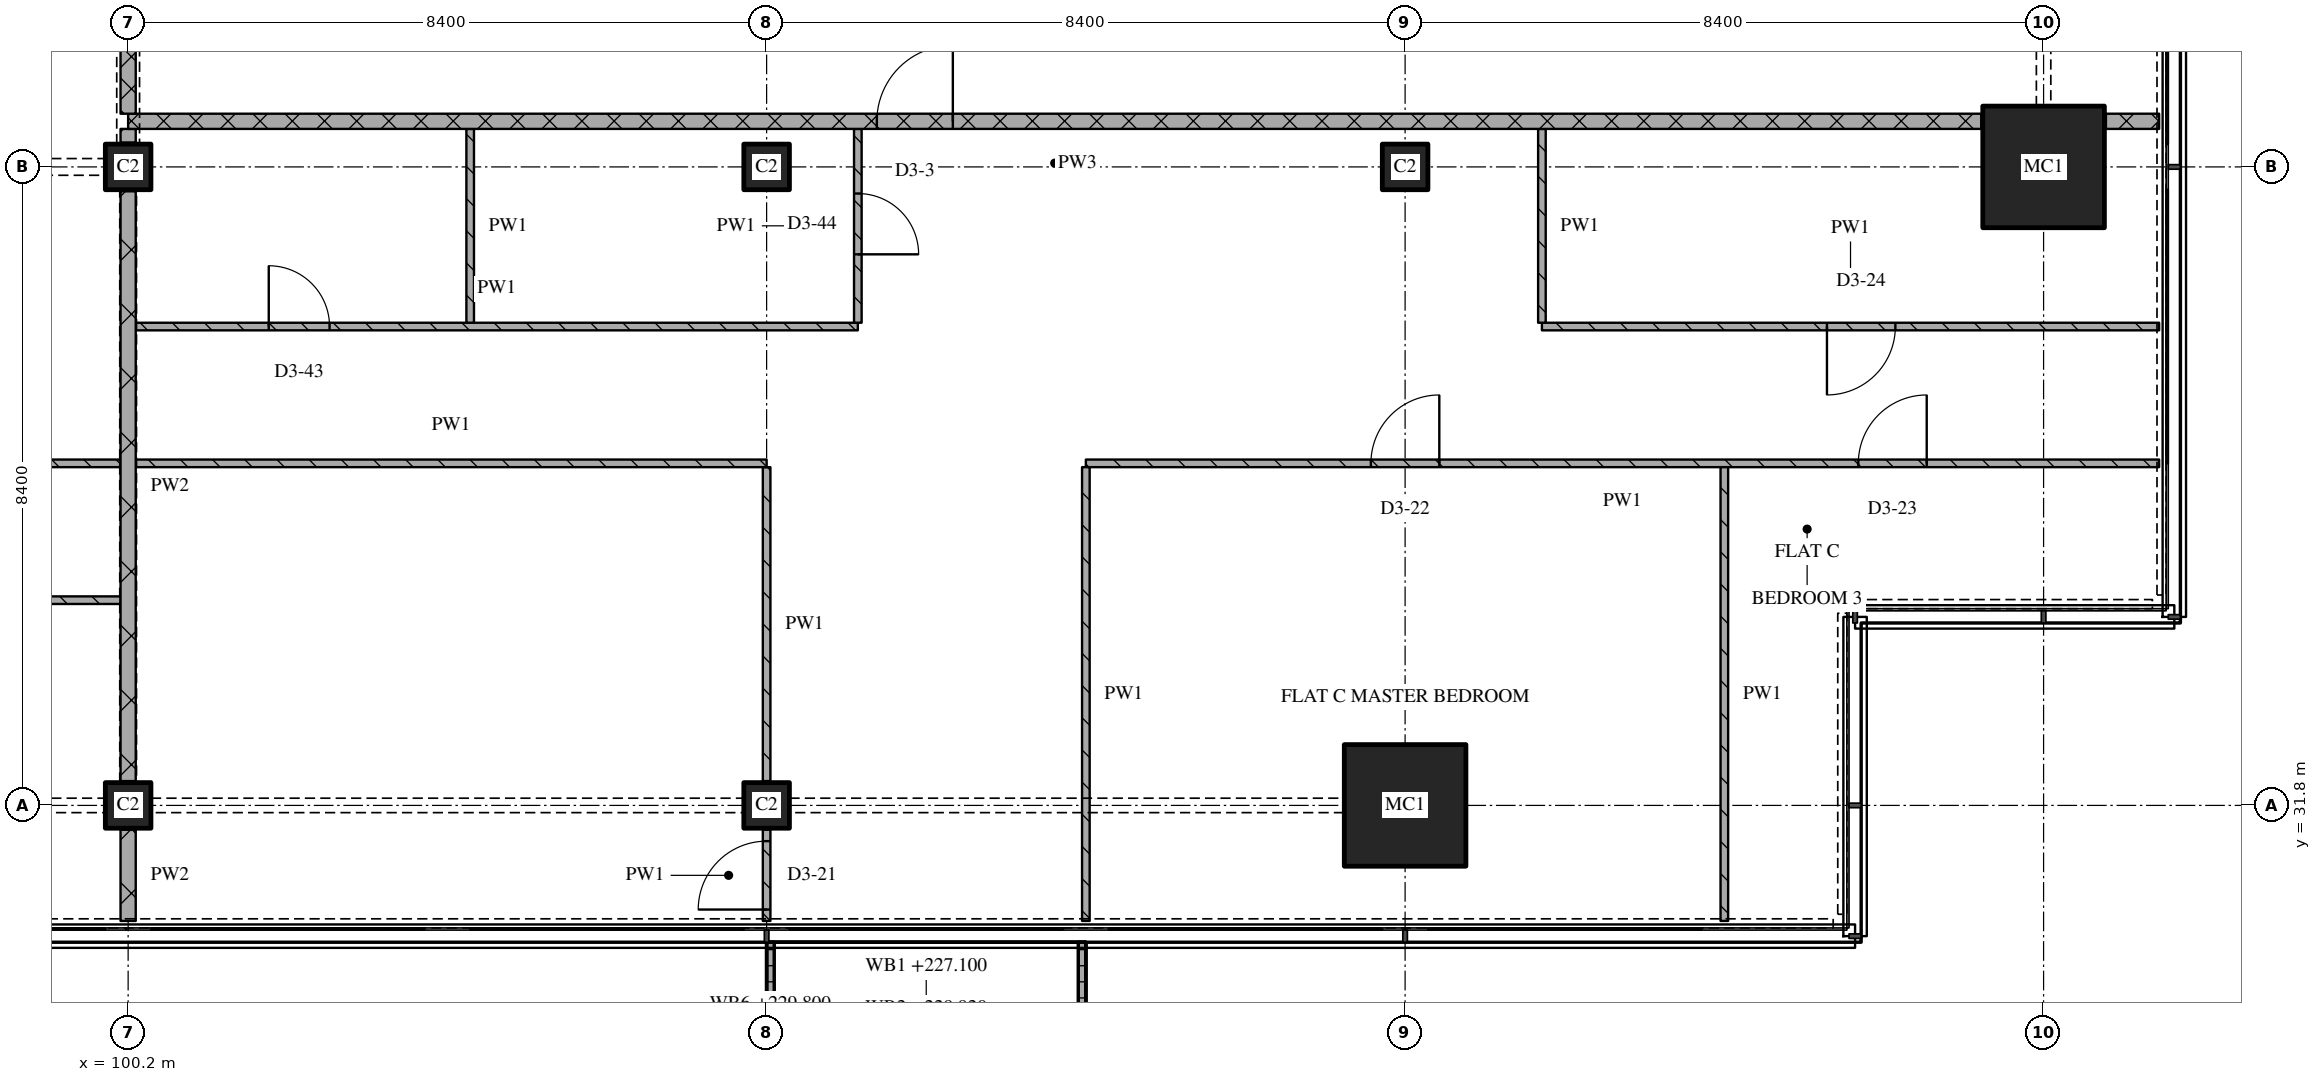
"""IFC4 building model, lengths in metres.
Left out: names, types, materials, properties, quantities, classifications, styles, units other than length and angle.
Written with IfcOpenShell. Run it as: python <this file> out.ifc"""

import sys

from ifc_helpers import new_model, si_unit, direction, frame, frame_2d, origin, origin_2d, place, context, subcontext, project, spatial, polyline, rectangle, outline, extrude, element, fill, save


model = new_model("IFC4")
c1 = context("Model", 3, precision=1e-05, world=origin(), true_north=direction((0.0, 1.0)))
c2 = subcontext(c1, "Body", "Model", "MODEL_VIEW")
j1 = project(units=[si_unit("LENGTHUNIT", "METRE"), si_unit("PLANEANGLEUNIT", "RADIAN")], contexts=[c1])
p1 = place(None, origin())
s1 = spatial("IfcSite", under=j1, at=p1, CompositionType="ELEMENT")
p2 = place(p1, origin())
s2 = spatial("IfcBuilding", under=s1, at=p2, CompositionType="ELEMENT")
p3 = place(p2, frame((0.0, 0.0, 227.1)))
s3 = spatial("IfcBuildingStorey", under=s2, at=p3, CompositionType="ELEMENT", Elevation=227.1)
for number, where, z_axis, x_axis in (
    (1, (100.2, 31.8, 0.0), (0.0, 0.0, 1.0), (1.0, 0.0, 0.0)),
    (2, (100.2, 40.2, 0.0), (0.0, 0.0, 1.0), (1.0, 0.0, 0.0)),
    (3, (108.6, 31.8, 0.0), (0.0, 0.0, 1.0), (1.0, 0.0, 0.0)),
    (4, (108.6, 40.2, 0.0), (0.0, 0.0, 1.0), (1.0, 0.0, 0.0)),
):
    element("IfcColumn", number, at=place(p3, frame(where, z_axis=z_axis, x_axis=x_axis)), inside=s3, PredefinedType="COLUMN", context=c2, shape_type="SweptSolid", body=[
        extrude(rectangle(XDim=0.6, YDim=0.6, at=origin_2d()), origin(), (0.0, 0.0, 1.0), 3.6),
    ])
p4 = place(p3, frame((117.0, 31.8, 0.0), z_axis=(0.0, 0.0, 1.0), x_axis=(1.0, 0.0, 0.0)))
e5 = element("IfcColumn", 5, at=p4, inside=s3, PredefinedType="COLUMN", context=c2, shape_type="SweptSolid", body=[
    extrude(rectangle(XDim=1.6, YDim=1.6, at=origin_2d()), origin(), (0.0, 0.0, 1.0), 3.6),
])
p5 = place(p3, frame((117.0, 40.2, 0.0), z_axis=(0.0, 0.0, 1.0), x_axis=(1.0, 0.0, 0.0)))
e6 = element("IfcColumn", 6, at=p5, inside=s3, PredefinedType="COLUMN", context=c2, shape_type="SweptSolid", body=[
    extrude(rectangle(XDim=0.6, YDim=0.6, at=origin_2d()), origin(), (0.0, 0.0, 1.0), 3.6),
])
p6 = place(p3, frame((125.4, 40.2, 0.0), z_axis=(0.0, 0.0, 1.0), x_axis=(1.0, 0.0, 0.0)))
e7 = element("IfcColumn", 7, at=p6, inside=s3, PredefinedType="COLUMN", context=c2, shape_type="SweptSolid", body=[
    extrude(rectangle(XDim=1.6, YDim=1.6, at=origin_2d()), origin(), (0.0, 0.0, 1.0), 3.6),
])
p7 = place(p3, origin())
e8 = element("IfcWall", 8, at=p7, inside=s3, PredefinedType="SOLIDWALL", context=c2, shape_type="SweptSolid", body=[
    extrude(outline(polyline([(108.6, 30.0), (108.7, 30.0), (108.7, 28.367), (112.7, 28.367), (112.7, 30.0), (112.8, 30.0), (112.8, 28.267), (108.6, 28.267), (108.6, 30.0)])), origin(), (0.0, 0.0, 1.0), 1.0),
])
p8 = place(p3, frame((100.1, 34.5, 0.0), z_axis=(0.0, 0.0, 1.0), x_axis=(-1.0, 0.0, 0.0)))
e9 = element("IfcWall", 9, at=p8, inside=s3, PredefinedType="PARTITIONING", context=c2, shape_type="SweptSolid", body=[
    extrude(rectangle(XDim=20.9, YDim=0.1, at=frame_2d((10.45, 0.0))), origin(), (0.0, 0.0, 1.0), 3.32),
])
p9 = place(p8, frame((3.65, 0.0, 0.0)))
e10 = element("IfcOpeningElement", 10, at=p9, cuts=e9, PredefinedType="OPENING", context=c2, shape_type="SweptSolid", body=[
    extrude(rectangle(XDim=0.9, YDim=2.1, at=frame_2d((0.45, 1.05))), frame((0.0, 0.06, 0.0), z_axis=(0.0, -1.0, 0.0), x_axis=(1.0, 0.0, 0.0)), (0.0, 0.0, 1.0), 0.12),
])
p10 = place(p8, frame((9.95, 0.0, 0.0)))
e11 = element("IfcOpeningElement", 11, at=p10, cuts=e9, PredefinedType="OPENING", context=c2, shape_type="SweptSolid", body=[
    extrude(rectangle(XDim=0.9, YDim=2.1, at=frame_2d((0.45, 1.05))), frame((0.0, 0.06, 0.0), z_axis=(0.0, -1.0, 0.0), x_axis=(1.0, 0.0, 0.0)), (0.0, 0.0, 1.0), 0.12),
])
p11 = place(p8, frame((14.15, 0.0, 0.0)))
e12 = element("IfcOpeningElement", 12, at=p11, cuts=e9, PredefinedType="OPENING", context=c2, shape_type="SweptSolid", body=[
    extrude(rectangle(XDim=0.9, YDim=2.1, at=frame_2d((0.45, 1.05))), frame((0.0, 0.06, 0.0), z_axis=(0.0, -1.0, 0.0), x_axis=(1.0, 0.0, 0.0)), (0.0, 0.0, 1.0), 0.12),
])
p12 = place(p8, frame((18.35, 0.0, 0.0)))
e13 = element("IfcOpeningElement", 13, at=p12, cuts=e9, PredefinedType="OPENING", context=c2, shape_type="SweptSolid", body=[
    extrude(rectangle(XDim=0.9, YDim=2.1, at=frame_2d((0.45, 1.05))), frame((0.0, 0.06, 0.0), z_axis=(0.0, -1.0, 0.0), x_axis=(1.0, 0.0, 0.0)), (0.0, 0.0, 1.0), 0.12),
])
p13 = place(p3, frame((126.92, 36.3, 0.0), z_axis=(0.0, 0.0, 1.0), x_axis=(-1.0, 0.0, 0.0)))
e14 = element("IfcWall", 14, at=p13, inside=s3, PredefinedType="PARTITIONING", context=c2, shape_type="SweptSolid", body=[
    extrude(rectangle(XDim=14.12, YDim=0.1, at=frame_2d((7.06, 0.0))), origin(), (0.0, 0.0, 1.0), 3.32),
])
p14 = place(p13, frame((3.058, 0.0, 0.0)))
e15 = element("IfcOpeningElement", 15, at=p14, cuts=e14, PredefinedType="OPENING", context=c2, shape_type="SweptSolid", body=[
    extrude(rectangle(XDim=0.9, YDim=2.1, at=frame_2d((0.45, 1.05))), frame((0.0, 0.06, 0.0), z_axis=(0.0, -1.0, 0.0), x_axis=(1.0, 0.0, 0.0)), (0.0, 0.0, 1.0), 0.12),
])
p15 = place(p13, frame((9.47, 0.0, 0.0)))
e16 = element("IfcOpeningElement", 16, at=p15, cuts=e14, PredefinedType="OPENING", context=c2, shape_type="SweptSolid", body=[
    extrude(rectangle(XDim=0.9, YDim=2.1, at=frame_2d((0.45, 1.05))), frame((0.0, 0.06, 0.0), z_axis=(0.0, -1.0, 0.0), x_axis=(1.0, 0.0, 0.0)), (0.0, 0.0, 1.0), 0.12),
])
p16 = place(p3, frame((100.3, 38.1, 0.0), z_axis=(0.0, 0.0, 1.0), x_axis=(1.0, 0.0, 0.0)))
e17 = element("IfcWall", 17, at=p16, inside=s3, PredefinedType="PARTITIONING", context=c2, shape_type="SweptSolid", body=[
    extrude(rectangle(XDim=9.5, YDim=0.1, at=frame_2d((4.75, 0.0))), origin(), (0.0, 0.0, 1.0), 3.32),
])
p17 = place(p16, frame((1.75, 0.0, 0.0)))
e18 = element("IfcOpeningElement", 18, at=p17, cuts=e17, PredefinedType="OPENING", context=c2, shape_type="SweptSolid", body=[
    extrude(rectangle(XDim=0.8, YDim=2.1, at=frame_2d((0.4, 1.05))), frame((0.0, 0.06, 0.0), z_axis=(0.0, -1.0, 0.0), x_axis=(1.0, 0.0, 0.0)), (0.0, 0.0, 1.0), 0.12),
])
p18 = place(p3, frame((118.8, 38.1, 0.0), z_axis=(0.0, 0.0, 1.0), x_axis=(1.0, 0.0, 0.0)))
e19 = element("IfcWall", 19, at=p18, inside=s3, PredefinedType="PARTITIONING", context=c2, shape_type="SweptSolid", body=[
    extrude(rectangle(XDim=8.12, YDim=0.1, at=frame_2d((4.06, 0.0))), origin(), (0.0, 0.0, 1.0), 3.32),
])
p19 = place(p18, frame((3.75, 0.0, 0.0)))
e20 = element("IfcOpeningElement", 20, at=p19, cuts=e19, PredefinedType="OPENING", context=c2, shape_type="SweptSolid", body=[
    extrude(rectangle(XDim=0.9, YDim=2.1, at=frame_2d((0.45, 1.05))), frame((0.0, 0.06, 0.0), z_axis=(0.0, -1.0, 0.0), x_axis=(1.0, 0.0, 0.0)), (0.0, 0.0, 1.0), 0.12),
])
p20 = place(p3, frame((124.58, 40.8, 0.0), z_axis=(0.0, 0.0, 1.0), x_axis=(-1.0, 0.0, 0.0)))
e21 = element("IfcWall", 21, at=p20, inside=s3, PredefinedType="PARTITIONING", context=c2, shape_type="SweptSolid", body=[
    extrude(rectangle(XDim=24.38, YDim=0.2, at=frame_2d((12.19, 0.0))), origin(), (0.0, 0.0, 1.0), 3.32),
])
p21 = place(p20, frame((13.53, 0.0, 0.0)))
e22 = element("IfcOpeningElement", 22, at=p21, cuts=e21, PredefinedType="OPENING", context=c2, shape_type="SweptSolid", body=[
    extrude(rectangle(XDim=1.0, YDim=2.1, at=frame_2d((0.5, 1.05))), frame((0.0, 0.11, 0.0), z_axis=(0.0, -1.0, 0.0), x_axis=(1.0, 0.0, 0.0)), (0.0, 0.0, 1.0), 0.22),
])
p22 = place(p3, frame((126.22, 40.8, 0.0), z_axis=(0.0, 0.0, 1.0), x_axis=(1.0, 0.0, 0.0)))
e23 = element("IfcWall", 23, at=p22, inside=s3, PredefinedType="PARTITIONING", context=c2, shape_type="SweptSolid", body=[
    extrude(rectangle(XDim=0.7, YDim=0.2, at=frame_2d((0.35, 0.0))), origin(), (0.0, 0.0, 1.0), 3.32),
])
p23 = place(p3, frame((100.2, 43.1, 0.0), z_axis=(0.0, 0.0, 1.0), x_axis=(0.0, -1.0, 0.0)))
e24 = element("IfcWall", 24, at=p23, inside=s3, PredefinedType="PARTITIONING", context=c2, shape_type="SweptSolid", body=[
    extrude(rectangle(XDim=2.2, YDim=0.2, at=frame_2d((1.1, 0.0))), origin(), (0.0, 0.0, 1.0), 2.53),
])
p24 = place(p3, frame((100.2, 31.48, 0.0), z_axis=(0.0, 0.0, 1.0), x_axis=(0.0, -1.0, 0.0)))
e25 = element("IfcWall", 25, at=p24, inside=s3, PredefinedType="PARTITIONING", context=c2, shape_type="SweptSolid", body=[
    extrude(rectangle(XDim=1.2, YDim=0.2, at=frame_2d((0.6, 0.0))), origin(), (0.0, 0.0, 1.0), 3.32),
])
p25 = place(p3, frame((100.2, 39.88, 0.0), z_axis=(0.0, 0.0, 1.0), x_axis=(0.0, -1.0, 0.0)))
e26 = element("IfcWall", 26, at=p25, inside=s3, PredefinedType="PARTITIONING", context=c2, shape_type="SweptSolid", body=[
    extrude(rectangle(XDim=7.76, YDim=0.2, at=frame_2d((3.88, 0.0))), origin(), (0.0, 0.0, 1.0), 2.72),
])
p26 = place(p3, frame((100.2, 40.7, 0.0), z_axis=(0.0, 0.0, 1.0), x_axis=(0.0, -1.0, 0.0)))
e27 = element("IfcWall", 27, at=p26, inside=s3, PredefinedType="PARTITIONING", context=c2, shape_type="SweptSolid", body=[
    extrude(rectangle(XDim=0.18, YDim=0.2, at=frame_2d((0.09, 0.0))), origin(), (0.0, 0.0, 1.0), 3.32),
])
p27 = place(p3, frame((104.7, 40.7, 0.0), z_axis=(0.0, 0.0, 1.0), x_axis=(0.0, -1.0, 0.0)))
e28 = element("IfcWall", 28, at=p27, inside=s3, PredefinedType="PARTITIONING", context=c2, shape_type="SweptSolid", body=[
    extrude(rectangle(XDim=2.55, YDim=0.1, at=frame_2d((1.275, 0.0))), origin(), (0.0, 0.0, 1.0), 3.32),
])
p28 = place(p3, frame((108.6, 30.28, 0.0), z_axis=(0.0, 0.0, 1.0), x_axis=(0.0, 1.0, 0.0)))
e29 = element("IfcWall", 29, at=p28, inside=s3, PredefinedType="PARTITIONING", context=c2, shape_type="SweptSolid", body=[
    extrude(rectangle(XDim=1.2, YDim=0.1, at=frame_2d((0.6, 0.0))), origin(), (0.0, 0.0, 1.0), 3.32),
])
p29 = place(p28, frame((0.15, 0.0, 0.0)))
e30 = element("IfcOpeningElement", 30, at=p29, cuts=e29, PredefinedType="OPENING", context=c2, shape_type="SweptSolid", body=[
    extrude(rectangle(XDim=0.9, YDim=2.1, at=frame_2d((0.45, 1.05))), frame((0.0, 0.06, 0.0), z_axis=(0.0, -1.0, 0.0), x_axis=(1.0, 0.0, 0.0)), (0.0, 0.0, 1.0), 0.12),
])
p30 = place(p3, frame((108.6, 36.25, 0.0), z_axis=(0.0, 0.0, 1.0), x_axis=(0.0, -1.0, 0.0)))
e31 = element("IfcWall", 31, at=p30, inside=s3, PredefinedType="PARTITIONING", context=c2, shape_type="SweptSolid", body=[
    extrude(rectangle(XDim=4.13, YDim=0.1, at=frame_2d((2.065, 0.0))), origin(), (0.0, 0.0, 1.0), 3.32),
])
p31 = place(p3, frame((109.8, 38.15, 0.0), z_axis=(0.0, 0.0, 1.0), x_axis=(0.0, 1.0, 0.0)))
e32 = element("IfcWall", 32, at=p31, inside=s3, PredefinedType="PARTITIONING", context=c2, shape_type="SweptSolid", body=[
    extrude(rectangle(XDim=2.55, YDim=0.1, at=frame_2d((1.275, 0.0))), origin(), (0.0, 0.0, 1.0), 3.32),
])
p32 = place(p31, frame((0.9, 0.0, 0.0)))
e33 = element("IfcOpeningElement", 33, at=p32, cuts=e32, PredefinedType="OPENING", context=c2, shape_type="SweptSolid", body=[
    extrude(rectangle(XDim=0.8, YDim=2.1, at=frame_2d((0.4, 1.05))), frame((0.0, 0.06, 0.0), z_axis=(0.0, -1.0, 0.0), x_axis=(1.0, 0.0, 0.0)), (0.0, 0.0, 1.0), 0.12),
])
p33 = place(p3, frame((112.8, 36.25, 0.0), z_axis=(0.0, 0.0, 1.0), x_axis=(0.0, -1.0, 0.0)))
e34 = element("IfcWall", 34, at=p33, inside=s3, PredefinedType="PARTITIONING", context=c2, shape_type="SweptSolid", body=[
    extrude(rectangle(XDim=5.97, YDim=0.1, at=frame_2d((2.985, 0.0))), origin(), (0.0, 0.0, 1.0), 3.32),
])
p34 = place(p3, frame((118.8, 40.7, 0.0), z_axis=(0.0, 0.0, 1.0), x_axis=(0.0, -1.0, 0.0)))
e35 = element("IfcWall", 35, at=p34, inside=s3, PredefinedType="PARTITIONING", context=c2, shape_type="SweptSolid", body=[
    extrude(rectangle(XDim=2.55, YDim=0.1, at=frame_2d((1.275, 0.0))), origin(), (0.0, 0.0, 1.0), 3.32),
])
p35 = place(p3, frame((121.2, 36.25, 0.0), z_axis=(0.0, 0.0, 1.0), x_axis=(0.0, -1.0, 0.0)))
e36 = element("IfcWall", 36, at=p35, inside=s3, PredefinedType="PARTITIONING", context=c2, shape_type="SweptSolid", body=[
    extrude(rectangle(XDim=5.97, YDim=0.1, at=frame_2d((2.985, 0.0))), origin(), (0.0, 0.0, 1.0), 3.32),
])
p36 = place(p3, frame((92.942, 36.3, 0.0), z_axis=(0.0, 0.0, 1.0), x_axis=(1.0, 0.0, 0.0)))
e37 = element("IfcWall", 37, at=p36, inside=s3, PredefinedType="PARTITIONING", context=c2, shape_type="SweptSolid", body=[
    extrude(rectangle(XDim=7.158, YDim=0.1, at=frame_2d((3.579, 0.0))), origin(), (0.0, 0.0, 1.0), 3.32),
])
p37 = place(p36, frame((3.179, 0.0, 0.0)))
e38 = element("IfcOpeningElement", 38, at=p37, cuts=e37, PredefinedType="OPENING", context=c2, shape_type="SweptSolid", body=[
    extrude(rectangle(XDim=0.9, YDim=2.1, at=frame_2d((0.45, 1.05))), frame((0.0, 0.06, 0.0), z_axis=(0.0, -1.0, 0.0), x_axis=(1.0, 0.0, 0.0)), (0.0, 0.0, 1.0), 0.12),
])
p38 = place(p3, frame((100.3, 36.3, 0.0), z_axis=(0.0, 0.0, 1.0), x_axis=(1.0, 0.0, 0.0)))
e39 = element("IfcWall", 39, at=p38, inside=s3, PredefinedType="PARTITIONING", context=c2, shape_type="SweptSolid", body=[
    extrude(rectangle(XDim=8.3, YDim=0.1, at=frame_2d((4.15, 0.0))), origin(), (0.0, 0.0, 1.0), 3.32),
])
p39 = place(p14, origin())
e40 = element("IfcDoor", 40, at=p39, inside=s3, OperationType="SINGLE_SWING_RIGHT", PredefinedType="DOOR", context=c2, shape_type="SweptSolid", body=[
    extrude(rectangle(XDim=0.9, YDim=2.1, at=frame_2d((0.45, 1.05))), frame((0.0, 0.025, 0.0), z_axis=(0.0, -1.0, 0.0), x_axis=(1.0, 0.0, 0.0)), (0.0, 0.0, 1.0), 0.05),
])
fill(e15, e40)
p40 = place(p15, origin())
e41 = element("IfcDoor", 41, at=p40, inside=s3, OperationType="SINGLE_SWING_RIGHT", PredefinedType="DOOR", context=c2, shape_type="SweptSolid", body=[
    extrude(rectangle(XDim=0.9, YDim=2.1, at=frame_2d((0.45, 1.05))), frame((0.0, 0.025, 0.0), z_axis=(0.0, -1.0, 0.0), x_axis=(1.0, 0.0, 0.0)), (0.0, 0.0, 1.0), 0.05),
])
fill(e16, e41)
p41 = place(p17, origin())
e42 = element("IfcDoor", 42, at=p41, inside=s3, OperationType="SINGLE_SWING_LEFT", PredefinedType="DOOR", context=c2, shape_type="SweptSolid", body=[
    extrude(rectangle(XDim=0.8, YDim=2.1, at=frame_2d((0.4, 1.05))), frame((0.0, 0.025, 0.0), z_axis=(0.0, -1.0, 0.0), x_axis=(1.0, 0.0, 0.0)), (0.0, 0.0, 1.0), 0.05),
])
fill(e18, e42)
p42 = place(p19, origin())
e43 = element("IfcDoor", 43, at=p42, inside=s3, OperationType="SINGLE_SWING_RIGHT", PredefinedType="DOOR", context=c2, shape_type="SweptSolid", body=[
    extrude(rectangle(XDim=0.9, YDim=2.1, at=frame_2d((0.45, 1.05))), frame((0.0, 0.025, 0.0), z_axis=(0.0, -1.0, 0.0), x_axis=(1.0, 0.0, 0.0)), (0.0, 0.0, 1.0), 0.05),
])
fill(e20, e43)
p43 = place(p21, origin())
e44 = element("IfcDoor", 44, at=p43, inside=s3, OperationType="SINGLE_SWING_RIGHT", PredefinedType="DOOR", context=c2, shape_type="SweptSolid", body=[
    extrude(rectangle(XDim=1.0, YDim=2.1, at=frame_2d((0.5, 1.05))), frame((0.0, 0.025, 0.0), z_axis=(0.0, -1.0, 0.0), x_axis=(1.0, 0.0, 0.0)), (0.0, 0.0, 1.0), 0.05),
])
fill(e22, e44)
p44 = place(p29, origin())
e45 = element("IfcDoor", 45, at=p44, inside=s3, OperationType="SINGLE_SWING_LEFT", PredefinedType="DOOR", context=c2, shape_type="SweptSolid", body=[
    extrude(rectangle(XDim=0.9, YDim=2.1, at=frame_2d((0.45, 1.05))), frame((0.0, 0.025, 0.0), z_axis=(0.0, -1.0, 0.0), x_axis=(1.0, 0.0, 0.0)), (0.0, 0.0, 1.0), 0.05),
])
fill(e30, e45)
p45 = place(p32, origin())
e46 = element("IfcDoor", 46, at=p45, inside=s3, OperationType="SINGLE_SWING_RIGHT", PredefinedType="DOOR", context=c2, shape_type="SweptSolid", body=[
    extrude(rectangle(XDim=0.8, YDim=2.1, at=frame_2d((0.4, 1.05))), frame((0.0, 0.025, 0.0), z_axis=(0.0, -1.0, 0.0), x_axis=(1.0, 0.0, 0.0)), (0.0, 0.0, 1.0), 0.05),
])
fill(e33, e46)
save(model, sys.argv[1])
